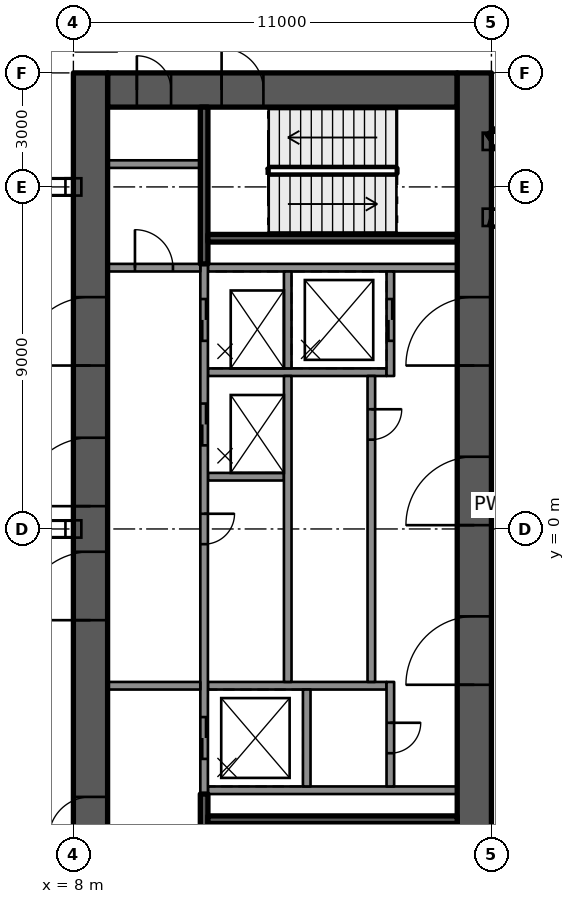
"""IFC4 building model, lengths in metres.
Left out: names, types, materials, properties, quantities, classifications, styles, units other than length and angle.
Written with IfcOpenShell. Run it as: python <this file> out.ifc"""

import sys

from ifc_helpers import new_model, si_unit, direction, frame, frame_2d, origin, place, context, subcontext, project, spatial, rectangle, extrude, element, fill, save


model = new_model("IFC4")
c1 = context("Model", 3, precision=1e-05, world=origin(), true_north=direction((0.0, 1.0)))
c2 = subcontext(c1, "Body", "Model", "MODEL_VIEW")
j1 = project(units=[si_unit("LENGTHUNIT", "METRE"), si_unit("PLANEANGLEUNIT", "RADIAN")], contexts=[c1])
p1 = place(None, origin())
s1 = spatial("IfcSite", under=j1, at=p1, CompositionType="ELEMENT")
p2 = place(p1, origin())
s2 = spatial("IfcBuilding", under=s1, at=p2, CompositionType="ELEMENT")
p3 = place(p2, frame((0.0, 0.0, 271.0)))
s3 = spatial("IfcBuildingStorey", under=s2, at=p3, CompositionType="ELEMENT", Elevation=271.0)
p4 = place(p3, frame((8.9, 11.55, 0.0), z_axis=(0.0, 0.0, 1.0), x_axis=(1.0, 0.0, 0.0)))
e1 = element("IfcWall", 1, at=p4, inside=s3, PredefinedType="SHEAR", context=c2, shape_type="SweptSolid", body=[
    extrude(rectangle(XDim=9.2, YDim=0.9, at=frame_2d((4.6, 0.0))), origin(), (0.0, 0.0, 1.0), 4.4),
])
p5 = place(p4, frame((3.0, 0.0, 0.0)))
e2 = element("IfcOpeningElement", 2, at=p5, cuts=e1, PredefinedType="OPENING", context=c2, shape_type="SweptSolid", body=[
    extrude(rectangle(XDim=1.1, YDim=2.1, at=frame_2d((0.55, 1.05))), frame((0.0, 0.46, 0.0), z_axis=(0.0, -1.0, 0.0), x_axis=(1.0, 0.0, 0.0)), (0.0, 0.0, 1.0), 0.92),
])
p6 = place(p4, frame((0.77, 0.0, 0.0)))
e3 = element("IfcOpeningElement", 3, at=p6, cuts=e1, PredefinedType="OPENING", context=c2, shape_type="SweptSolid", body=[
    extrude(rectangle(XDim=0.9, YDim=2.1, at=frame_2d((0.45, 1.05))), frame((0.0, 0.46, 0.0), z_axis=(0.0, -1.0, 0.0), x_axis=(1.0, 0.0, 0.0)), (0.0, 0.0, 1.0), 0.92),
])
p7 = place(p3, frame((8.45, -12.0, 0.0), z_axis=(0.0, 0.0, 1.0), x_axis=(0.0, 1.0, 0.0)))
e4 = element("IfcWall", 4, at=p7, inside=s3, PredefinedType="SHEAR", context=c2, shape_type="SweptSolid", body=[
    extrude(rectangle(XDim=24.0, YDim=0.9, at=frame_2d((12.0, 0.0))), origin(), (0.0, 0.0, 1.0), 4.4),
])
p8 = place(p7, frame((12.6, 0.0, 0.0)))
e5 = element("IfcOpeningElement", 5, at=p8, cuts=e4, PredefinedType="OPENING", context=c2, shape_type="SweptSolid", body=[
    extrude(rectangle(XDim=1.8, YDim=2.1, at=frame_2d((0.9, 1.05))), frame((0.0, 0.46, 0.0), z_axis=(0.0, -1.0, 0.0), x_axis=(1.0, 0.0, 0.0)), (0.0, 0.0, 1.0), 0.92),
])
p9 = place(p7, frame((16.3, 0.0, 0.0)))
e6 = element("IfcOpeningElement", 6, at=p9, cuts=e4, PredefinedType="OPENING", context=c2, shape_type="SweptSolid", body=[
    extrude(rectangle(XDim=1.8, YDim=2.1, at=frame_2d((0.9, 1.05))), frame((0.0, 0.46, 0.0), z_axis=(0.0, -1.0, 0.0), x_axis=(1.0, 0.0, 0.0)), (0.0, 0.0, 1.0), 0.92),
])
p10 = place(p7, frame((9.6, 0.0, 0.0)))
e7 = element("IfcOpeningElement", 7, at=p10, cuts=e4, PredefinedType="OPENING", context=c2, shape_type="SweptSolid", body=[
    extrude(rectangle(XDim=1.8, YDim=2.1, at=frame_2d((0.9, 1.05))), frame((0.0, 0.46, 0.0), z_axis=(0.0, -1.0, 0.0), x_axis=(1.0, 0.0, 0.0)), (0.0, 0.0, 1.0), 0.92),
])
p11 = place(p7, frame((3.85, 0.0, 0.0)))
e8 = element("IfcOpeningElement", 8, at=p11, cuts=e4, PredefinedType="OPENING", context=c2, shape_type="SweptSolid", body=[
    extrude(rectangle(XDim=1.1, YDim=2.1, at=frame_2d((0.55, 1.05))), frame((0.0, 0.46, 0.0), z_axis=(0.0, -1.0, 0.0), x_axis=(1.0, 0.0, 0.0)), (0.0, 0.0, 1.0), 0.92),
])
p12 = place(p3, frame((18.55, -12.0, 0.0), z_axis=(0.0, 0.0, 1.0), x_axis=(0.0, 1.0, 0.0)))
e9 = element("IfcWall", 9, at=p12, inside=s3, PredefinedType="SHEAR", context=c2, shape_type="SweptSolid", body=[
    extrude(rectangle(XDim=24.0, YDim=0.9, at=frame_2d((12.0, 0.0))), origin(), (0.0, 0.0, 1.0), 4.4),
])
p13 = place(p12, frame((16.3, 0.0, 0.0)))
e10 = element("IfcOpeningElement", 10, at=p13, cuts=e9, PredefinedType="OPENING", context=c2, shape_type="SweptSolid", body=[
    extrude(rectangle(XDim=1.8, YDim=2.1, at=frame_2d((0.9, 1.05))), frame((0.0, 0.46, 0.0), z_axis=(0.0, -1.0, 0.0), x_axis=(1.0, 0.0, 0.0)), (0.0, 0.0, 1.0), 0.92),
])
p14 = place(p12, frame((12.1, 0.0, 0.0)))
e11 = element("IfcOpeningElement", 11, at=p14, cuts=e9, PredefinedType="OPENING", context=c2, shape_type="SweptSolid", body=[
    extrude(rectangle(XDim=1.8, YDim=2.1, at=frame_2d((0.9, 1.05))), frame((0.0, 0.46, 0.0), z_axis=(0.0, -1.0, 0.0), x_axis=(1.0, 0.0, 0.0)), (0.0, 0.0, 1.0), 0.92),
])
p15 = place(p12, frame((7.9, 0.0, 0.0)))
e12 = element("IfcOpeningElement", 12, at=p15, cuts=e9, PredefinedType="OPENING", context=c2, shape_type="SweptSolid", body=[
    extrude(rectangle(XDim=1.8, YDim=2.1, at=frame_2d((0.9, 1.05))), frame((0.0, 0.46, 0.0), z_axis=(0.0, -1.0, 0.0), x_axis=(1.0, 0.0, 0.0)), (0.0, 0.0, 1.0), 0.92),
])
for number, where, z_axis, x_axis in (
    (13, (11.54, -6.875, 0.0), (0.0, 0.0, 1.0), (1.0, 0.0, 0.0)),
    (14, (11.54, 6.875, 0.0), (0.0, 0.0, 1.0), (1.0, 0.0, 0.0)),
):
    element("IfcWall", number, at=place(p3, frame(where, z_axis=z_axis, x_axis=x_axis)), inside=s3, PredefinedType="SOLIDWALL", context=c2, shape_type="SweptSolid", body=[
        extrude(rectangle(XDim=6.56, YDim=0.2, at=frame_2d((3.28, 0.0))), origin(), (0.0, 0.0, 1.0), 3.99),
    ])
p16 = place(p3, frame((11.54, 4.125, 0.0), z_axis=(0.0, 0.0, 1.0), x_axis=(1.0, 0.0, 0.0)))
e15 = element("IfcWall", 15, at=p16, inside=s3, PredefinedType="SOLIDWALL", context=c2, shape_type="SweptSolid", body=[
    extrude(rectangle(XDim=4.7, YDim=0.2, at=frame_2d((2.35, 0.0))), origin(), (0.0, 0.0, 1.0), 3.99),
])
p17 = place(p3, frame((11.54, 1.375, 0.0), z_axis=(0.0, 0.0, 1.0), x_axis=(1.0, 0.0, 0.0)))
e16 = element("IfcWall", 16, at=p17, inside=s3, PredefinedType="SOLIDWALL", context=c2, shape_type="SweptSolid", body=[
    extrude(rectangle(XDim=2.0, YDim=0.2, at=frame_2d((1.0, 0.0))), origin(), (0.0, 0.0, 1.0), 3.99),
])
p18 = place(p3, frame((11.54, -4.125, 0.0), z_axis=(0.0, 0.0, 1.0), x_axis=(1.0, 0.0, 0.0)))
e17 = element("IfcWall", 17, at=p18, inside=s3, PredefinedType="SOLIDWALL", context=c2, shape_type="SweptSolid", body=[
    extrude(rectangle(XDim=4.7, YDim=0.2, at=frame_2d((2.35, 0.0))), origin(), (0.0, 0.0, 1.0), 3.99),
])
p19 = place(p3, frame((11.44, 6.975, 0.0), z_axis=(0.0, 0.0, 1.0), x_axis=(0.0, -1.0, 0.0)))
e18 = element("IfcWall", 18, at=p19, inside=s3, PredefinedType="SOLIDWALL", context=c2, shape_type="SweptSolid", body=[
    extrude(rectangle(XDim=13.95, YDim=0.2, at=frame_2d((6.975, 0.0))), origin(), (0.0, 0.0, 1.0), 3.99),
])
p20 = place(p19, frame((0.925, 0.0, 0.0)))
e19 = element("IfcOpeningElement", 19, at=p20, cuts=e18, PredefinedType="OPENING", context=c2, shape_type="SweptSolid", body=[
    extrude(rectangle(XDim=1.1, YDim=2.1, at=frame_2d((0.55, 1.05))), frame((0.0, 0.11, 0.0), z_axis=(0.0, -1.0, 0.0), x_axis=(1.0, 0.0, 0.0)), (0.0, 0.0, 1.0), 0.22),
])
p21 = place(p19, frame((3.675, 0.0, 0.0)))
e20 = element("IfcOpeningElement", 20, at=p21, cuts=e18, PredefinedType="OPENING", context=c2, shape_type="SweptSolid", body=[
    extrude(rectangle(XDim=1.1, YDim=2.1, at=frame_2d((0.55, 1.05))), frame((0.0, 0.11, 0.0), z_axis=(0.0, -1.0, 0.0), x_axis=(1.0, 0.0, 0.0)), (0.0, 0.0, 1.0), 0.22),
])
p22 = place(p19, frame((11.925, 0.0, 0.0)))
e21 = element("IfcOpeningElement", 21, at=p22, cuts=e18, PredefinedType="OPENING", context=c2, shape_type="SweptSolid", body=[
    extrude(rectangle(XDim=1.1, YDim=2.1, at=frame_2d((0.55, 1.05))), frame((0.0, 0.11, 0.0), z_axis=(0.0, -1.0, 0.0), x_axis=(1.0, 0.0, 0.0)), (0.0, 0.0, 1.0), 0.22),
])
p23 = place(p19, frame((6.575, 0.0, 0.0)))
e22 = element("IfcOpeningElement", 22, at=p23, cuts=e18, PredefinedType="OPENING", context=c2, shape_type="SweptSolid", body=[
    extrude(rectangle(XDim=0.8, YDim=2.1, at=frame_2d((0.4, 1.05))), frame((0.0, 0.11, 0.0), z_axis=(0.0, -1.0, 0.0), x_axis=(1.0, 0.0, 0.0)), (0.0, 0.0, 1.0), 0.22),
])
p24 = place(p3, frame((13.64, 6.775, 0.0), z_axis=(0.0, 0.0, 1.0), x_axis=(0.0, -1.0, 0.0)))
e23 = element("IfcWall", 23, at=p24, inside=s3, PredefinedType="SOLIDWALL", context=c2, shape_type="SweptSolid", body=[
    extrude(rectangle(XDim=2.55, YDim=0.2, at=frame_2d((1.275, 0.0))), origin(), (0.0, 0.0, 1.0), 3.99),
])
p25 = place(p3, frame((13.64, 4.025, 0.0), z_axis=(0.0, 0.0, 1.0), x_axis=(0.0, -1.0, 0.0)))
e24 = element("IfcWall", 24, at=p25, inside=s3, PredefinedType="SOLIDWALL", context=c2, shape_type="SweptSolid", body=[
    extrude(rectangle(XDim=8.05, YDim=0.2, at=frame_2d((4.025, 0.0))), origin(), (0.0, 0.0, 1.0), 3.99),
])
p26 = place(p3, frame((14.14, -4.225, 0.0), z_axis=(0.0, 0.0, 1.0), x_axis=(0.0, -1.0, 0.0)))
e25 = element("IfcWall", 25, at=p26, inside=s3, PredefinedType="SOLIDWALL", context=c2, shape_type="SweptSolid", body=[
    extrude(rectangle(XDim=2.55, YDim=0.2, at=frame_2d((1.275, 0.0))), origin(), (0.0, 0.0, 1.0), 3.99),
])
p27 = place(p3, frame((16.34, 6.775, 0.0), z_axis=(0.0, 0.0, 1.0), x_axis=(0.0, -1.0, 0.0)))
e26 = element("IfcWall", 26, at=p27, inside=s3, PredefinedType="SOLIDWALL", context=c2, shape_type="SweptSolid", body=[
    extrude(rectangle(XDim=2.75, YDim=0.2, at=frame_2d((1.375, 0.0))), origin(), (0.0, 0.0, 1.0), 3.99),
])
p28 = place(p27, frame((0.725, 0.0, 0.0)))
e27 = element("IfcOpeningElement", 27, at=p28, cuts=e26, PredefinedType="OPENING", context=c2, shape_type="SweptSolid", body=[
    extrude(rectangle(XDim=1.1, YDim=2.1, at=frame_2d((0.55, 1.05))), frame((0.0, 0.11, 0.0), z_axis=(0.0, -1.0, 0.0), x_axis=(1.0, 0.0, 0.0)), (0.0, 0.0, 1.0), 0.22),
])
p29 = place(p3, frame((15.84, 4.025, 0.0), z_axis=(0.0, 0.0, 1.0), x_axis=(0.0, -1.0, 0.0)))
e28 = element("IfcWall", 28, at=p29, inside=s3, PredefinedType="SOLIDWALL", context=c2, shape_type="SweptSolid", body=[
    extrude(rectangle(XDim=8.05, YDim=0.2, at=frame_2d((4.025, 0.0))), origin(), (0.0, 0.0, 1.0), 3.99),
])
p30 = place(p29, frame((0.875, 0.0, 0.0)))
e29 = element("IfcOpeningElement", 29, at=p30, cuts=e28, PredefinedType="OPENING", context=c2, shape_type="SweptSolid", body=[
    extrude(rectangle(XDim=0.8, YDim=2.1, at=frame_2d((0.4, 1.05))), frame((0.0, 0.11, 0.0), z_axis=(0.0, -1.0, 0.0), x_axis=(1.0, 0.0, 0.0)), (0.0, 0.0, 1.0), 0.22),
])
p31 = place(p3, frame((16.34, -4.025, 0.0), z_axis=(0.0, 0.0, 1.0), x_axis=(0.0, -1.0, 0.0)))
e30 = element("IfcWall", 30, at=p31, inside=s3, PredefinedType="SOLIDWALL", context=c2, shape_type="SweptSolid", body=[
    extrude(rectangle(XDim=2.75, YDim=0.2, at=frame_2d((1.375, 0.0))), origin(), (0.0, 0.0, 1.0), 3.99),
])
p32 = place(p31, frame((1.075, 0.0, 0.0)))
e31 = element("IfcOpeningElement", 31, at=p32, cuts=e30, PredefinedType="OPENING", context=c2, shape_type="SweptSolid", body=[
    extrude(rectangle(XDim=0.8, YDim=2.1, at=frame_2d((0.4, 1.05))), frame((0.0, 0.11, 0.0), z_axis=(0.0, -1.0, 0.0), x_axis=(1.0, 0.0, 0.0)), (0.0, 0.0, 1.0), 0.22),
])
p33 = place(p3, frame((11.44, -6.975, 0.0), z_axis=(0.0, 0.0, 1.0), x_axis=(0.0, -1.0, 0.0)))
e32 = element("IfcWall", 32, at=p33, inside=s3, PredefinedType="SOLIDWALL", context=c2, shape_type="SweptSolid", body=[
    extrude(rectangle(XDim=4.125, YDim=0.2, at=frame_2d((2.062, 0.0))), origin(), (0.0, 0.0, 1.0), 3.99),
])
p34 = place(p33, frame((2.1, 0.0, 0.0)))
e33 = element("IfcOpeningElement", 33, at=p34, cuts=e32, PredefinedType="OPENING", context=c2, shape_type="SweptSolid", body=[
    extrude(rectangle(XDim=1.1, YDim=2.1, at=frame_2d((0.55, 1.05))), frame((0.0, 0.11, 0.0), z_axis=(0.0, -1.0, 0.0), x_axis=(1.0, 0.0, 0.0)), (0.0, 0.0, 1.0), 0.22),
])
p35 = place(p3, frame((11.54, -7.65, 0.0), z_axis=(0.0, 0.0, 1.0), x_axis=(1.0, 0.0, 0.0)))
e34 = element("IfcWall", 34, at=p35, inside=s3, PredefinedType="SOLIDWALL", context=c2, shape_type="SweptSolid", body=[
    extrude(rectangle(XDim=6.56, YDim=0.2, at=frame_2d((3.28, 0.0))), origin(), (0.0, 0.0, 1.0), 3.99),
])
p36 = place(p3, frame((11.44, 11.1, 0.0), z_axis=(0.0, 0.0, 1.0), x_axis=(0.0, -1.0, 0.0)))
e35 = element("IfcWall", 35, at=p36, inside=s3, PredefinedType="SOLIDWALL", context=c2, shape_type="SweptSolid", body=[
    extrude(rectangle(XDim=4.125, YDim=0.2, at=frame_2d((2.062, 0.0))), origin(), (0.0, 0.0, 1.0), 3.99),
])
p37 = place(p3, frame((11.54, 7.65, 0.0), z_axis=(0.0, 0.0, 1.0), x_axis=(1.0, 0.0, 0.0)))
e36 = element("IfcWall", 36, at=p37, inside=s3, PredefinedType="SOLIDWALL", context=c2, shape_type="SweptSolid", body=[
    extrude(rectangle(XDim=6.56, YDim=0.2, at=frame_2d((3.28, 0.0))), origin(), (0.0, 0.0, 1.0), 3.99),
])
p38 = place(p3, frame((8.9, -4.125, 0.0), z_axis=(0.0, 0.0, 1.0), x_axis=(1.0, 0.0, 0.0)))
e37 = element("IfcWall", 37, at=p38, inside=s3, PredefinedType="PARTITIONING", context=c2, shape_type="SweptSolid", body=[
    extrude(rectangle(XDim=2.44, YDim=0.2, at=frame_2d((1.22, 0.0))), origin(), (0.0, 0.0, 1.0), 3.99),
])
p39 = place(p3, frame((8.9, 6.875, 0.0), z_axis=(0.0, 0.0, 1.0), x_axis=(1.0, 0.0, 0.0)))
e38 = element("IfcWall", 38, at=p39, inside=s3, PredefinedType="PARTITIONING", context=c2, shape_type="SweptSolid", body=[
    extrude(rectangle(XDim=2.44, YDim=0.2, at=frame_2d((1.22, 0.0))), origin(), (0.0, 0.0, 1.0), 3.99),
])
p40 = place(p39, frame((0.72, 0.0, 0.0)))
e39 = element("IfcOpeningElement", 39, at=p40, cuts=e38, PredefinedType="OPENING", context=c2, shape_type="SweptSolid", body=[
    extrude(rectangle(XDim=1.0, YDim=2.1, at=frame_2d((0.5, 1.05))), frame((0.0, 0.11, 0.0), z_axis=(0.0, -1.0, 0.0), x_axis=(1.0, 0.0, 0.0)), (0.0, 0.0, 1.0), 0.22),
])
p41 = place(p3, frame((8.9, 9.6, 0.0), z_axis=(0.0, 0.0, 1.0), x_axis=(1.0, 0.0, 0.0)))
e40 = element("IfcWall", 40, at=p41, inside=s3, PredefinedType="PARTITIONING", context=c2, shape_type="SweptSolid", body=[
    extrude(rectangle(XDim=2.44, YDim=0.2, at=frame_2d((1.22, 0.0))), origin(), (0.0, 0.0, 1.0), 3.99),
])
p42 = place(p20, origin())
e41 = element("IfcDoor", 41, at=p42, inside=s3, OperationType="DOUBLE_DOOR_SLIDING", PredefinedType="DOOR", context=c2, shape_type="SweptSolid", body=[
    extrude(rectangle(XDim=1.1, YDim=2.1, at=frame_2d((0.55, 1.05))), frame((0.0, 0.025, 0.0), z_axis=(0.0, -1.0, 0.0), x_axis=(1.0, 0.0, 0.0)), (0.0, 0.0, 1.0), 0.05),
])
fill(e19, e41)
p43 = place(p28, origin())
e42 = element("IfcDoor", 42, at=p43, inside=s3, OperationType="DOUBLE_DOOR_SLIDING", PredefinedType="DOOR", context=c2, shape_type="SweptSolid", body=[
    extrude(rectangle(XDim=1.1, YDim=2.1, at=frame_2d((0.55, 1.05))), frame((0.0, 0.025, 0.0), z_axis=(0.0, -1.0, 0.0), x_axis=(1.0, 0.0, 0.0)), (0.0, 0.0, 1.0), 0.05),
])
fill(e27, e42)
p44 = place(p21, origin())
e43 = element("IfcDoor", 43, at=p44, inside=s3, OperationType="DOUBLE_DOOR_SLIDING", PredefinedType="DOOR", context=c2, shape_type="SweptSolid", body=[
    extrude(rectangle(XDim=1.1, YDim=2.1, at=frame_2d((0.55, 1.05))), frame((0.0, 0.025, 0.0), z_axis=(0.0, -1.0, 0.0), x_axis=(1.0, 0.0, 0.0)), (0.0, 0.0, 1.0), 0.05),
])
fill(e20, e43)
p45 = place(p22, origin())
e44 = element("IfcDoor", 44, at=p45, inside=s3, OperationType="DOUBLE_DOOR_SLIDING", PredefinedType="DOOR", context=c2, shape_type="SweptSolid", body=[
    extrude(rectangle(XDim=1.1, YDim=2.1, at=frame_2d((0.55, 1.05))), frame((0.0, 0.025, 0.0), z_axis=(0.0, -1.0, 0.0), x_axis=(1.0, 0.0, 0.0)), (0.0, 0.0, 1.0), 0.05),
])
fill(e21, e44)
p46 = place(p30, origin())
e45 = element("IfcDoor", 45, at=p46, inside=s3, OperationType="SINGLE_SWING_LEFT", PredefinedType="DOOR", context=c2, shape_type="SweptSolid", body=[
    extrude(rectangle(XDim=0.8, YDim=2.1, at=frame_2d((0.4, 1.05))), frame((0.0, 0.025, 0.0), z_axis=(0.0, -1.0, 0.0), x_axis=(1.0, 0.0, 0.0)), (0.0, 0.0, 1.0), 0.05),
])
fill(e29, e45)
p47 = place(p23, origin())
e46 = element("IfcDoor", 46, at=p47, inside=s3, OperationType="SINGLE_SWING_LEFT", PredefinedType="DOOR", context=c2, shape_type="SweptSolid", body=[
    extrude(rectangle(XDim=0.8, YDim=2.1, at=frame_2d((0.4, 1.05))), frame((0.0, 0.025, 0.0), z_axis=(0.0, -1.0, 0.0), x_axis=(1.0, 0.0, 0.0)), (0.0, 0.0, 1.0), 0.05),
])
fill(e22, e46)
p48 = place(p32, origin())
e47 = element("IfcDoor", 47, at=p48, inside=s3, OperationType="SINGLE_SWING_LEFT", PredefinedType="DOOR", context=c2, shape_type="SweptSolid", body=[
    extrude(rectangle(XDim=0.8, YDim=2.1, at=frame_2d((0.4, 1.05))), frame((0.0, 0.025, 0.0), z_axis=(0.0, -1.0, 0.0), x_axis=(1.0, 0.0, 0.0)), (0.0, 0.0, 1.0), 0.05),
])
fill(e31, e47)
p49 = place(p8, origin())
e48 = element("IfcDoor", 48, at=p49, inside=s3, OperationType="SINGLE_SWING_RIGHT", PredefinedType="DOOR", context=c2, shape_type="SweptSolid", body=[
    extrude(rectangle(XDim=1.8, YDim=2.1, at=frame_2d((0.9, 1.05))), frame((0.0, 0.025, 0.0), z_axis=(0.0, -1.0, 0.0), x_axis=(1.0, 0.0, 0.0)), (0.0, 0.0, 1.0), 0.05),
])
fill(e5, e48)
p50 = place(p13, origin())
e49 = element("IfcDoor", 49, at=p50, inside=s3, OperationType="SINGLE_SWING_RIGHT", PredefinedType="DOOR", context=c2, shape_type="SweptSolid", body=[
    extrude(rectangle(XDim=1.8, YDim=2.1, at=frame_2d((0.9, 1.05))), frame((0.0, 0.025, 0.0), z_axis=(0.0, -1.0, 0.0), x_axis=(1.0, 0.0, 0.0)), (0.0, 0.0, 1.0), 0.05),
])
fill(e10, e49)
p51 = place(p14, origin())
e50 = element("IfcDoor", 50, at=p51, inside=s3, OperationType="SINGLE_SWING_RIGHT", PredefinedType="DOOR", context=c2, shape_type="SweptSolid", body=[
    extrude(rectangle(XDim=1.8, YDim=2.1, at=frame_2d((0.9, 1.05))), frame((0.0, 0.025, 0.0), z_axis=(0.0, -1.0, 0.0), x_axis=(1.0, 0.0, 0.0)), (0.0, 0.0, 1.0), 0.05),
])
fill(e11, e50)
p52 = place(p15, origin())
e51 = element("IfcDoor", 51, at=p52, inside=s3, OperationType="SINGLE_SWING_LEFT", PredefinedType="DOOR", context=c2, shape_type="SweptSolid", body=[
    extrude(rectangle(XDim=1.8, YDim=2.1, at=frame_2d((0.9, 1.05))), frame((0.0, 0.025, 0.0), z_axis=(0.0, -1.0, 0.0), x_axis=(1.0, 0.0, 0.0)), (0.0, 0.0, 1.0), 0.05),
])
fill(e12, e51)
p53 = place(p9, origin())
e52 = element("IfcDoor", 52, at=p53, inside=s3, OperationType="SINGLE_SWING_RIGHT", PredefinedType="DOOR", context=c2, shape_type="SweptSolid", body=[
    extrude(rectangle(XDim=1.8, YDim=2.1, at=frame_2d((0.9, 1.05))), frame((0.0, 0.025, 0.0), z_axis=(0.0, -1.0, 0.0), x_axis=(1.0, 0.0, 0.0)), (0.0, 0.0, 1.0), 0.05),
])
fill(e6, e52)
p54 = place(p10, origin())
e53 = element("IfcDoor", 53, at=p54, inside=s3, OperationType="SINGLE_SWING_LEFT", PredefinedType="DOOR", context=c2, shape_type="SweptSolid", body=[
    extrude(rectangle(XDim=1.8, YDim=2.1, at=frame_2d((0.9, 1.05))), frame((0.0, 0.025, 0.0), z_axis=(0.0, -1.0, 0.0), x_axis=(1.0, 0.0, 0.0)), (0.0, 0.0, 1.0), 0.05),
])
fill(e7, e53)
p55 = place(p11, origin())
e54 = element("IfcDoor", 54, at=p55, inside=s3, OperationType="SINGLE_SWING_LEFT", PredefinedType="DOOR", context=c2, shape_type="SweptSolid", body=[
    extrude(rectangle(XDim=1.1, YDim=2.1, at=frame_2d((0.55, 1.05))), frame((0.0, 0.025, 0.0), z_axis=(0.0, -1.0, 0.0), x_axis=(1.0, 0.0, 0.0)), (0.0, 0.0, 1.0), 0.05),
])
fill(e8, e54)
p56 = place(p5, origin())
e55 = element("IfcDoor", 55, at=p56, inside=s3, OperationType="SINGLE_SWING_LEFT", PredefinedType="DOOR", context=c2, shape_type="SweptSolid", body=[
    extrude(rectangle(XDim=1.1, YDim=2.1, at=frame_2d((0.55, 1.05))), frame((0.0, 0.025, 0.0), z_axis=(0.0, -1.0, 0.0), x_axis=(1.0, 0.0, 0.0)), (0.0, 0.0, 1.0), 0.05),
])
fill(e2, e55)
p57 = place(p6, origin())
e56 = element("IfcDoor", 56, at=p57, inside=s3, OperationType="SINGLE_SWING_LEFT", PredefinedType="DOOR", context=c2, shape_type="SweptSolid", body=[
    extrude(rectangle(XDim=0.9, YDim=2.1, at=frame_2d((0.45, 1.05))), frame((0.0, 0.025, 0.0), z_axis=(0.0, -1.0, 0.0), x_axis=(1.0, 0.0, 0.0)), (0.0, 0.0, 1.0), 0.05),
])
fill(e3, e56)
p58 = place(p40, origin())
e57 = element("IfcDoor", 57, at=p58, inside=s3, OperationType="SINGLE_SWING_RIGHT", PredefinedType="DOOR", context=c2, shape_type="SweptSolid", body=[
    extrude(rectangle(XDim=1.0, YDim=2.1, at=frame_2d((0.5, 1.05))), frame((0.0, 0.025, 0.0), z_axis=(0.0, -1.0, 0.0), x_axis=(1.0, 0.0, 0.0)), (0.0, 0.0, 1.0), 0.05),
])
fill(e39, e57)
save(model, sys.argv[1])
